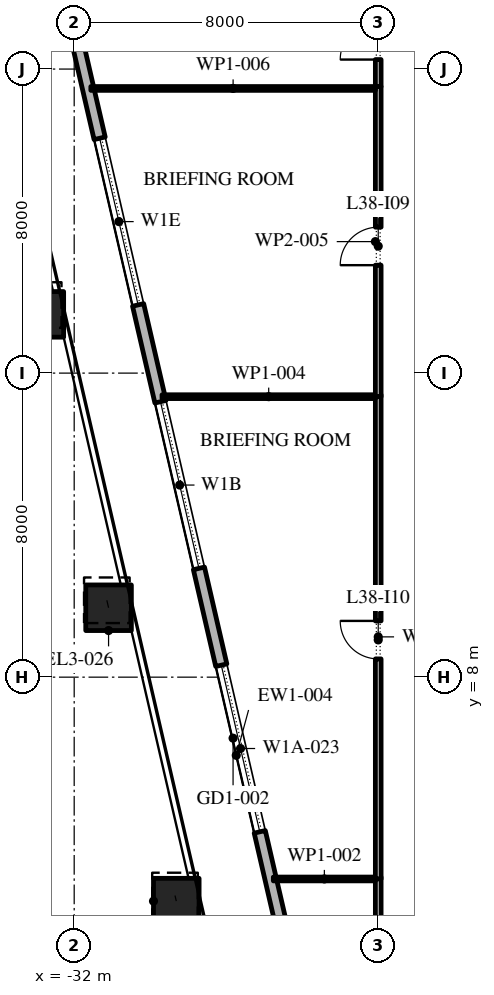
"""IFC4 building model, lengths in metres.
Left out: names, types, materials, properties, quantities, classifications, styles, units other than length and angle.
Written with IfcOpenShell. Run it as: python <this file> out.ifc"""

import sys

from ifc_helpers import new_model, si_unit, direction, frame, frame_2d, origin, origin_2d, place, context, subcontext, project, spatial, rectangle, extrude, element, fill, save


model = new_model("IFC4")
c1 = context("Model", 3, precision=1e-05, world=origin(), true_north=direction((0.0, 1.0)))
c2 = subcontext(c1, "Body", "Model", "MODEL_VIEW")
j1 = project(units=[si_unit("LENGTHUNIT", "METRE"), si_unit("PLANEANGLEUNIT", "RADIAN")], contexts=[c1])
p1 = place(None, origin())
s1 = spatial("IfcSite", under=j1, at=p1, CompositionType="ELEMENT")
p2 = place(p1, origin())
s2 = spatial("IfcBuilding", under=s1, at=p2, CompositionType="ELEMENT")
p3 = place(p2, frame((0.0, 0.0, 175.8)))
s3 = spatial("IfcBuildingStorey", under=s2, at=p3, CompositionType="ELEMENT", Elevation=175.8)
p4 = place(p3, frame((-32.878, 17.546, 0.0), z_axis=(-0.013461799865, 0.058373149415, 0.998204064995), x_axis=(-0.974423835271, -0.224718021653, 0.0)))
e1 = element("IfcColumn", 1, at=p4, inside=s3, PredefinedType="COLUMN", context=c2, shape_type="SweptSolid", body=[
    extrude(rectangle(XDim=1.2, YDim=1.2, at=origin_2d()), origin(), (0.0, 0.0, 1.0), 4.208),
])
p5 = place(p3, frame((-31.095, 9.826, 0.0), z_axis=(-0.010799648955, 0.046682353548, 0.998851403087), x_axis=(-0.974268511785, -0.225390476607, 0.0)))
e2 = element("IfcColumn", 2, at=p5, inside=s3, PredefinedType="COLUMN", context=c2, shape_type="SweptSolid", body=[
    extrude(rectangle(XDim=1.2, YDim=1.2, at=origin_2d()), origin(), (0.0, 0.0, 1.0), 4.205),
])
p6 = place(p3, frame((-29.313, 2.107, 0.0), z_axis=(-0.0080747472, 0.035087390713, 0.999351626541), x_axis=(-0.974526982896, -0.224270282488, 0.0)))
e3 = element("IfcColumn", 3, at=p6, inside=s3, PredefinedType="COLUMN", context=c2, shape_type="SweptSolid", body=[
    extrude(rectangle(XDim=1.2, YDim=1.2, at=origin_2d()), origin(), (0.0, 0.0, 1.0), 4.203),
])
p7 = place(p3, frame((-33.157, 30.092, 0.0), z_axis=(0.0, 0.0, 1.0), x_axis=(0.224950279389, -0.974370243697, 0.0)))
e4 = element("IfcWall", 4, at=p7, inside=s3, PredefinedType="STANDARD", context=c2, shape_type="SweptSolid", body=[
    extrude(rectangle(XDim=49.5, YDim=0.3, at=frame_2d((24.75, 0.0))), origin(), (0.0, 0.0, 1.0), 4.0),
])
p8 = place(p7, frame((2.207, 0.0, 0.0)))
e5 = element("IfcOpeningElement", 5, at=p8, cuts=e4, PredefinedType="OPENING", context=c2, shape_type="SweptSolid", body=[
    extrude(rectangle(XDim=2.4, YDim=3.5, at=frame_2d((1.2, 1.75))), frame((0.0, 0.16, 0.0), z_axis=(0.0, -1.0, 0.0), x_axis=(1.0, 0.0, 0.0)), (0.0, 0.0, 1.0), 0.32),
])
p9 = place(p7, frame((8.121, 0.0, 0.45)))
e6 = element("IfcOpeningElement", 6, at=p9, cuts=e4, PredefinedType="OPENING", context=c2, shape_type="SweptSolid", body=[
    extrude(rectangle(XDim=4.5, YDim=2.825, at=frame_2d((2.25, 1.413))), frame((0.0, 0.16, 0.0), z_axis=(0.0, -1.0, 0.0), x_axis=(1.0, 0.0, 0.0)), (0.0, 0.0, 1.0), 0.32),
])
p10 = place(p7, frame((15.236, 0.0, 0.45)))
e7 = element("IfcOpeningElement", 7, at=p10, cuts=e4, PredefinedType="OPENING", context=c2, shape_type="SweptSolid", body=[
    extrude(rectangle(XDim=4.5, YDim=2.95, at=frame_2d((2.25, 1.475))), frame((0.0, 0.16, 0.0), z_axis=(0.0, -1.0, 0.0), x_axis=(1.0, 0.0, 0.0)), (0.0, 0.0, 1.0), 0.32),
])
p11 = place(p7, frame((22.35, 0.0, 0.45)))
e8 = element("IfcOpeningElement", 8, at=p11, cuts=e4, PredefinedType="OPENING", context=c2, shape_type="SweptSolid", body=[
    extrude(rectangle(XDim=4.5, YDim=3.0, at=frame_2d((2.25, 1.5))), frame((0.0, 0.16, 0.0), z_axis=(0.0, -1.0, 0.0), x_axis=(1.0, 0.0, 0.0)), (0.0, 0.0, 1.0), 0.32),
])
p12 = place(p7, frame((30.514, 0.0, 0.0)))
e9 = element("IfcOpeningElement", 9, at=p12, cuts=e4, PredefinedType="OPENING", context=c2, shape_type="SweptSolid", body=[
    extrude(rectangle(XDim=2.4, YDim=3.5, at=frame_2d((1.2, 1.75))), frame((0.0, 0.16, 0.0), z_axis=(0.0, -1.0, 0.0), x_axis=(1.0, 0.0, 0.0)), (0.0, 0.0, 1.0), 0.32),
])
p13 = place(p7, frame((36.579, 0.0, 0.45)))
e10 = element("IfcOpeningElement", 10, at=p13, cuts=e4, PredefinedType="OPENING", context=c2, shape_type="SweptSolid", body=[
    extrude(rectangle(XDim=4.5, YDim=3.05, at=frame_2d((2.25, 1.525))), frame((0.0, 0.16, 0.0), z_axis=(0.0, -1.0, 0.0), x_axis=(1.0, 0.0, 0.0)), (0.0, 0.0, 1.0), 0.32),
])
p14 = place(p7, frame((43.693, 0.0, 0.45)))
e11 = element("IfcOpeningElement", 11, at=p14, cuts=e4, PredefinedType="OPENING", context=c2, shape_type="SweptSolid", body=[
    extrude(rectangle(XDim=4.5, YDim=3.05, at=frame_2d((2.25, 1.525))), frame((0.0, 0.16, 0.0), z_axis=(0.0, -1.0, 0.0), x_axis=(1.0, 0.0, 0.0)), (0.0, 0.0, 1.0), 0.32),
])
p15 = place(p3, frame((-24.0, -5.075, 0.0), z_axis=(0.0, 0.0, 1.0), x_axis=(0.0, 1.0, 0.0)))
e12 = element("IfcWall", 12, at=p15, inside=s3, PredefinedType="PARTITIONING", context=c2, shape_type="SweptSolid", body=[
    extrude(rectangle(XDim=7.815, YDim=0.15, at=frame_2d((3.907, 0.0))), origin(), (0.0, 0.0, 1.0), 4.0),
])
p16 = place(p3, frame((-24.075, 2.69, 0.0), z_axis=(0.0, 0.0, 1.0), x_axis=(-1.0, 0.0, 0.0)))
e13 = element("IfcWall", 13, at=p16, inside=s3, PredefinedType="PARTITIONING", context=c2, shape_type="SweptSolid", body=[
    extrude(rectangle(XDim=2.685, YDim=0.1, at=frame_2d((1.343, 0.0))), origin(), (0.0, 0.0, 1.0), 4.0),
])
p17 = place(p3, frame((-24.0, 2.69, 0.0), z_axis=(0.0, 0.0, 1.0), x_axis=(0.0, 1.0, 0.0)))
e14 = element("IfcWall", 14, at=p17, inside=s3, PredefinedType="PARTITIONING", context=c2, shape_type="SweptSolid", body=[
    extrude(rectangle(XDim=12.74, YDim=0.15, at=frame_2d((6.37, 0.0))), origin(), (0.0, 0.0, 1.0), 4.0),
])
p18 = place(p17, frame((5.79, 0.0, 0.0)))
e15 = element("IfcOpeningElement", 15, at=p18, cuts=e14, PredefinedType="OPENING", context=c2, shape_type="SweptSolid", body=[
    extrude(rectangle(XDim=1.0, YDim=2.1, at=frame_2d((0.5, 1.05))), frame((0.0, 0.085, 0.0), z_axis=(0.0, -1.0, 0.0), x_axis=(1.0, 0.0, 0.0)), (0.0, 0.0, 1.0), 0.17),
])
p19 = place(p3, frame((-24.075, 15.38, 0.0), z_axis=(0.0, 0.0, 1.0), x_axis=(-1.0, 0.0, 0.0)))
e16 = element("IfcWall", 16, at=p19, inside=s3, PredefinedType="PARTITIONING", context=c2, shape_type="SweptSolid", body=[
    extrude(rectangle(XDim=5.614, YDim=0.1, at=frame_2d((2.807, 0.0))), origin(), (0.0, 0.0, 1.0), 4.0),
])
p20 = place(p3, frame((-24.0, 15.38, 0.0), z_axis=(0.0, 0.0, 1.0), x_axis=(0.0, 1.0, 0.0)))
e17 = element("IfcWall", 17, at=p20, inside=s3, PredefinedType="PARTITIONING", context=c2, shape_type="SweptSolid", body=[
    extrude(rectangle(XDim=8.16, YDim=0.15, at=frame_2d((4.08, 0.0))), origin(), (0.0, 0.0, 1.0), 4.0),
])
p21 = place(p20, frame((3.46, 0.0, 0.0)))
e18 = element("IfcOpeningElement", 18, at=p21, cuts=e17, PredefinedType="OPENING", context=c2, shape_type="SweptSolid", body=[
    extrude(rectangle(XDim=1.0, YDim=2.1, at=frame_2d((0.5, 1.05))), frame((0.0, 0.085, 0.0), z_axis=(0.0, -1.0, 0.0), x_axis=(1.0, 0.0, 0.0)), (0.0, 0.0, 1.0), 0.17),
])
p22 = place(p3, frame((-24.075, 23.49, 0.0), z_axis=(0.0, 0.0, 1.0), x_axis=(-1.0, 0.0, 0.0)))
e19 = element("IfcWall", 19, at=p22, inside=s3, PredefinedType="PARTITIONING", context=c2, shape_type="SweptSolid", body=[
    extrude(rectangle(XDim=7.487, YDim=0.1, at=frame_2d((3.744, 0.0))), origin(), (0.0, 0.0, 1.0), 4.0),
])
p23 = place(p3, frame((-24.0, 23.54, 0.0), z_axis=(0.0, 0.0, 1.0), x_axis=(0.0, 1.0, 0.0)))
e20 = element("IfcWall", 20, at=p23, inside=s3, PredefinedType="PARTITIONING", context=c2, shape_type="SweptSolid", body=[
    extrude(rectangle(XDim=3.935, YDim=0.15, at=frame_2d((1.968, 0.0))), origin(), (0.0, 0.0, 1.0), 4.0),
])
p24 = place(p23, frame((0.71, 0.0, 0.0)))
e21 = element("IfcOpeningElement", 21, at=p24, cuts=e20, PredefinedType="OPENING", context=c2, shape_type="SweptSolid", body=[
    extrude(rectangle(XDim=1.0, YDim=2.1, at=frame_2d((0.5, 1.05))), frame((0.0, 0.085, 0.0), z_axis=(0.0, -1.0, 0.0), x_axis=(1.0, 0.0, 0.0)), (0.0, 0.0, 1.0), 0.17),
])
p25 = place(p9, origin())
e22 = element("IfcWindow", 22, at=p25, inside=s3, PartitioningType="DOUBLE_PANEL_VERTICAL", PredefinedType="WINDOW", context=c2, shape_type="SweptSolid", body=[
    extrude(rectangle(XDim=4.5, YDim=2.825, at=frame_2d((2.25, 1.413))), frame((0.0, 0.03, 0.0), z_axis=(0.0, -1.0, 0.0), x_axis=(1.0, 0.0, 0.0)), (0.0, 0.0, 1.0), 0.06),
])
fill(e6, e22)
p26 = place(p10, origin())
e23 = element("IfcWindow", 23, at=p26, inside=s3, PartitioningType="DOUBLE_PANEL_VERTICAL", PredefinedType="WINDOW", context=c2, shape_type="SweptSolid", body=[
    extrude(rectangle(XDim=4.5, YDim=2.95, at=frame_2d((2.25, 1.475))), frame((0.0, 0.03, 0.0), z_axis=(0.0, -1.0, 0.0), x_axis=(1.0, 0.0, 0.0)), (0.0, 0.0, 1.0), 0.06),
])
fill(e7, e23)
p27 = place(p11, origin())
e24 = element("IfcWindow", 24, at=p27, inside=s3, PartitioningType="DOUBLE_PANEL_VERTICAL", PredefinedType="WINDOW", context=c2, shape_type="SweptSolid", body=[
    extrude(rectangle(XDim=4.5, YDim=3.0, at=frame_2d((2.25, 1.5))), frame((0.0, 0.03, 0.0), z_axis=(0.0, -1.0, 0.0), x_axis=(1.0, 0.0, 0.0)), (0.0, 0.0, 1.0), 0.06),
])
fill(e8, e24)
p28 = place(p24, origin())
e25 = element("IfcDoor", 25, at=p28, inside=s3, OperationType="SINGLE_SWING_RIGHT", PredefinedType="DOOR", context=c2, shape_type="SweptSolid", body=[
    extrude(rectangle(XDim=1.0, YDim=2.1, at=frame_2d((0.5, 1.05))), frame((0.0, 0.025, 0.0), z_axis=(0.0, -1.0, 0.0), x_axis=(1.0, 0.0, 0.0)), (0.0, 0.0, 1.0), 0.05),
])
fill(e21, e25)
p29 = place(p21, origin())
e26 = element("IfcDoor", 26, at=p29, inside=s3, OperationType="SINGLE_SWING_RIGHT", PredefinedType="DOOR", context=c2, shape_type="SweptSolid", body=[
    extrude(rectangle(XDim=1.0, YDim=2.1, at=frame_2d((0.5, 1.05))), frame((0.0, 0.025, 0.0), z_axis=(0.0, -1.0, 0.0), x_axis=(1.0, 0.0, 0.0)), (0.0, 0.0, 1.0), 0.05),
])
fill(e18, e26)
p30 = place(p18, origin())
e27 = element("IfcDoor", 27, at=p30, inside=s3, OperationType="SINGLE_SWING_LEFT", PredefinedType="DOOR", context=c2, shape_type="SweptSolid", body=[
    extrude(rectangle(XDim=1.0, YDim=2.1, at=frame_2d((0.5, 1.05))), frame((0.0, 0.025, 0.0), z_axis=(0.0, -1.0, 0.0), x_axis=(1.0, 0.0, 0.0)), (0.0, 0.0, 1.0), 0.05),
])
fill(e15, e27)
save(model, sys.argv[1])
